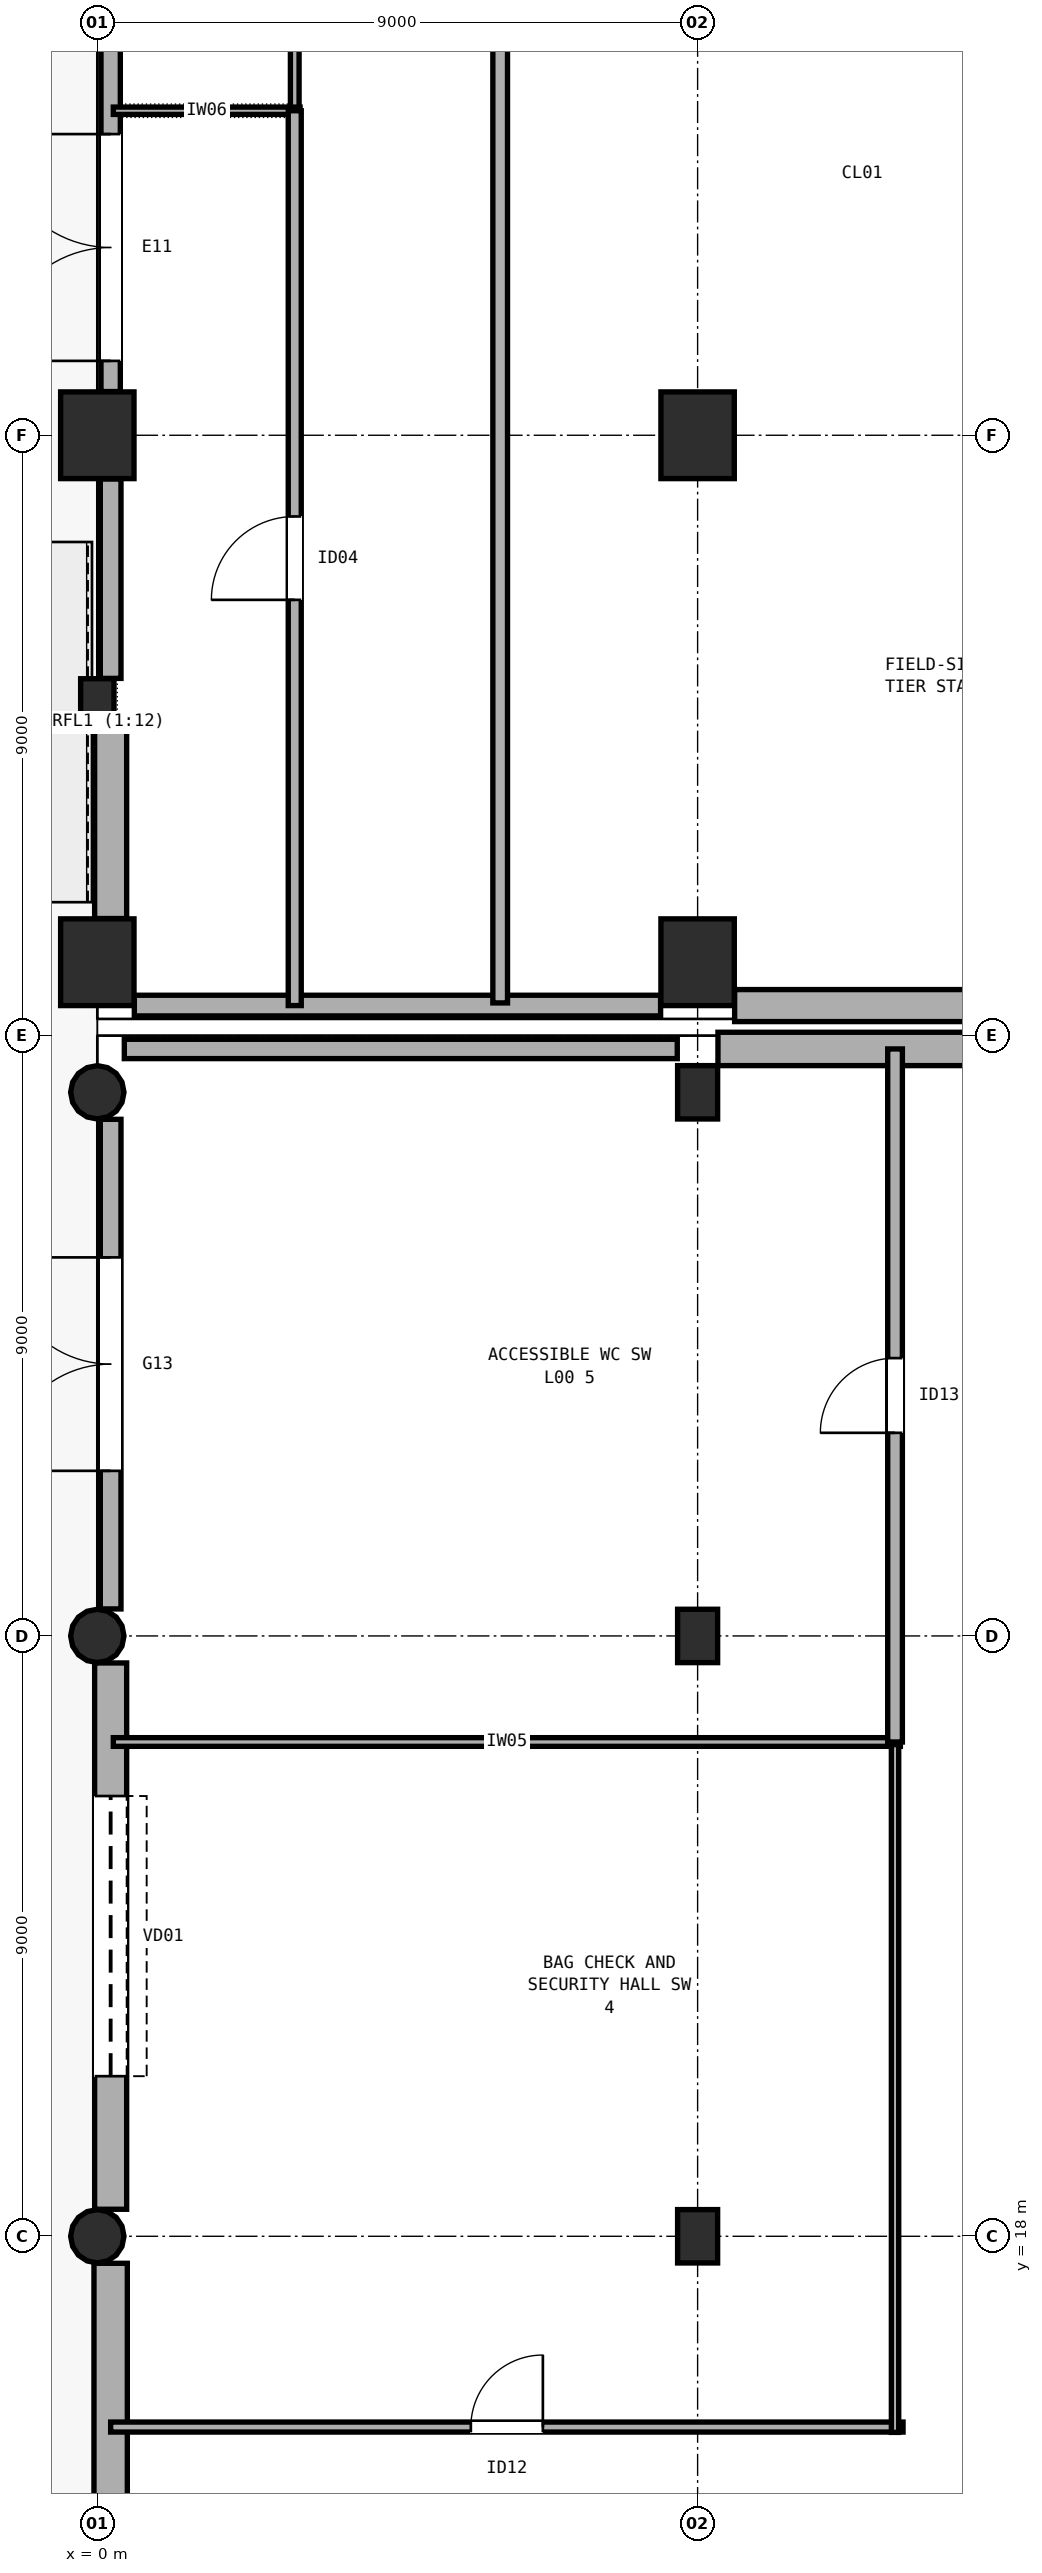
"""IFC4 building model, lengths in metres.
Left out: names, types, materials, properties, quantities, classifications, styles, units other than length and angle.
Written with IfcOpenShell. Run it as: python <this file> out.ifc"""

import sys

from ifc_helpers import new_model, si_unit, direction, frame, frame_2d, origin, origin_2d, place, context, subcontext, project, spatial, rectangle, circle, extrude, element, fill, save


model = new_model("IFC4")
c1 = context("Model", 3, precision=1e-05, world=origin(), true_north=direction((0.0, 1.0)))
c2 = subcontext(c1, "Body", "Model", "MODEL_VIEW")
j1 = project(units=[si_unit("LENGTHUNIT", "METRE"), si_unit("PLANEANGLEUNIT", "RADIAN")], contexts=[c1])
p1 = place(None, origin())
s1 = spatial("IfcSite", under=j1, at=p1, CompositionType="ELEMENT")
p2 = place(p1, origin())
s2 = spatial("IfcBuilding", under=s1, at=p2, CompositionType="ELEMENT")
p3 = place(p2, origin())
s3 = spatial("IfcBuildingStorey", under=s2, at=p3, CompositionType="ELEMENT", Elevation=0.0)
for number, where, z_axis, x_axis in (
    (1, (0.0, 37.1, 0.0), (0.0, 0.0, 1.0), (1.0, 0.0, 0.0)),
    (2, (0.0, 45.0, 0.0), (0.0, 0.0, 1.0), (1.0, 0.0, 0.0)),
    (3, (9.0, 37.1, 0.0), (0.0, 0.0, 1.0), (1.0, 0.0, 0.0)),
    (4, (9.0, 45.0, 0.0), (0.0, 0.0, 1.0), (1.0, 0.0, 0.0)),
):
    element("IfcColumn", number, at=place(p3, frame(where, z_axis=z_axis, x_axis=x_axis)), inside=s3, PredefinedType="COLUMN", context=c2, shape_type="SweptSolid", body=[
        extrude(rectangle(XDim=1.1, YDim=1.3, at=origin_2d()), origin(), (0.0, 0.0, 1.0), 4.8),
    ])
for number, where, z_axis, x_axis in (
    (5, (0.0, 18.0, 0.0), (0.0, 0.0, 1.0), (1.0, 0.0, 0.0)),
    (6, (0.0, 27.0, 0.0), (0.0, 0.0, 1.0), (1.0, 0.0, 0.0)),
    (7, (0.0, 35.15, 0.0), (0.0, 0.0, 1.0), (1.0, 0.0, 0.0)),
):
    element("IfcColumn", number, at=place(p3, frame(where, z_axis=z_axis, x_axis=x_axis)), inside=s3, PredefinedType="COLUMN", context=c2, shape_type="SweptSolid", body=[
        extrude(circle(Radius=0.4, at=origin_2d()), origin(), (0.0, 0.0, 1.0), 4.8),
    ])
for number, where, z_axis, x_axis in (
    (8, (9.0, 18.0, 0.0), (0.0, 0.0, 1.0), (1.0, 0.0, 0.0)),
    (9, (9.0, 27.0, 0.0), (0.0, 0.0, 1.0), (1.0, 0.0, 0.0)),
    (10, (9.0, 35.15, 0.0), (0.0, 0.0, 1.0), (1.0, 0.0, 0.0)),
):
    element("IfcColumn", number, at=place(p3, frame(where, z_axis=z_axis, x_axis=x_axis)), inside=s3, PredefinedType="COLUMN", context=c2, shape_type="SweptSolid", body=[
        extrude(rectangle(XDim=0.6, YDim=0.8, at=origin_2d()), origin(), (0.0, 0.0, 1.0), 4.8),
    ])
p4 = place(p3, frame((0.0, 41.0, 0.0), z_axis=(0.0, 0.0, 1.0), x_axis=(1.0, 0.0, 0.0)))
e11 = element("IfcColumn", 11, at=p4, inside=s3, PredefinedType="PILASTER", context=c2, shape_type="SweptSolid", body=[
    extrude(rectangle(XDim=0.5, YDim=0.7, at=origin_2d()), origin(), (0.0, 0.0, 1.0), 4.8),
])
p5 = place(p3, frame((0.2, 37.755, 0.0), z_axis=(0.0, 0.0, 1.0), x_axis=(0.0, 1.0, 0.0)))
e12 = element("IfcWall", 12, at=p5, inside=s3, PredefinedType="SOLIDWALL", context=c2, shape_type="SweptSolid", body=[
    extrude(rectangle(XDim=2.89, YDim=0.48, at=frame_2d((1.445, 0.0))), origin(), (0.0, 0.0, 1.0), 3.28),
])
p6 = place(p3, frame((0.2, 41.355, 0.0), z_axis=(0.0, 0.0, 1.0), x_axis=(0.0, 1.0, 0.0)))
e13 = element("IfcWall", 13, at=p6, inside=s3, PredefinedType="SOLIDWALL", context=c2, shape_type="SweptSolid", body=[
    extrude(rectangle(XDim=2.99, YDim=0.31, at=frame_2d((1.495, 0.0))), origin(), (0.0, 0.0, 1.0), 3.28),
])
p7 = place(p3, frame((0.2, 45.655, 0.0), z_axis=(0.0, 0.0, 1.0), x_axis=(0.0, 1.0, 0.0)))
e14 = element("IfcWall", 14, at=p7, inside=s3, PredefinedType="SOLIDWALL", context=c2, shape_type="SweptSolid", body=[
    extrude(rectangle(XDim=5.89, YDim=0.29, at=frame_2d((2.945, 0.0))), origin(), (0.0, 0.0, 1.0), 3.58),
])
p8 = place(p7, frame((0.46, 0.0, 0.0)))
e15 = element("IfcOpeningElement", 15, at=p8, cuts=e14, PredefinedType="OPENING", context=c2, shape_type="SweptSolid", body=[
    extrude(rectangle(XDim=3.4, YDim=2.55, at=frame_2d((1.7, 1.275))), frame((0.0, 0.155, 0.0), z_axis=(0.0, -1.0, 0.0), x_axis=(1.0, 0.0, 0.0)), (0.0, 0.0, 1.0), 0.31),
])
p9 = place(p3, frame((17.395, 36.45, 0.0), z_axis=(0.0, 0.0, 1.0), x_axis=(-1.0, 0.0, 0.0)))
e16 = element("IfcWall", 16, at=p9, inside=s3, PredefinedType="SOLIDWALL", context=c2, shape_type="SweptSolid", body=[
    extrude(rectangle(XDim=7.84, YDim=0.48, at=frame_2d((3.92, 0.0))), origin(), (0.0, 0.0, 1.0), 3.28),
])
p10 = place(p3, frame((8.445, 36.45, 0.0), z_axis=(0.0, 0.0, 1.0), x_axis=(-1.0, 0.0, 0.0)))
e17 = element("IfcWall", 17, at=p10, inside=s3, PredefinedType="SOLIDWALL", context=c2, shape_type="SweptSolid", body=[
    extrude(rectangle(XDim=7.89, YDim=0.31, at=frame_2d((3.945, 0.0))), origin(), (0.0, 0.0, 1.0), 3.28),
])
p11 = place(p3, frame((0.2, 9.405, 0.0), z_axis=(0.0, 0.0, 1.0), x_axis=(0.0, 1.0, 0.0)))
e18 = element("IfcWall", 18, at=p11, inside=s3, PredefinedType="SOLIDWALL", context=c2, shape_type="SweptSolid", body=[
    extrude(rectangle(XDim=8.19, YDim=0.5, at=frame_2d((4.095, 0.0))), origin(), (0.0, 0.0, 1.0), 3.58),
])
p12 = place(p3, frame((0.2, 18.405, 0.0), z_axis=(0.0, 0.0, 1.0), x_axis=(0.0, 1.0, 0.0)))
e19 = element("IfcWall", 19, at=p12, inside=s3, PredefinedType="SOLIDWALL", context=c2, shape_type="SweptSolid", body=[
    extrude(rectangle(XDim=8.19, YDim=0.48, at=frame_2d((4.095, 0.0))), origin(), (0.0, 0.0, 1.0), 3.58),
])
p13 = place(p12, frame((1.995, 0.0, 0.0)))
e20 = element("IfcOpeningElement", 20, at=p13, cuts=e19, PredefinedType="OPENING", context=c2, shape_type="SweptSolid", body=[
    extrude(rectangle(XDim=4.2, YDim=3.15, at=frame_2d((2.1, 1.575))), frame((0.0, 0.25, 0.0), z_axis=(0.0, -1.0, 0.0), x_axis=(1.0, 0.0, 0.0)), (0.0, 0.0, 1.0), 0.5),
])
p14 = place(p3, frame((0.2, 27.405, 0.0), z_axis=(0.0, 0.0, 1.0), x_axis=(0.0, 1.0, 0.0)))
e21 = element("IfcWall", 21, at=p14, inside=s3, PredefinedType="SOLIDWALL", context=c2, shape_type="SweptSolid", body=[
    extrude(rectangle(XDim=7.34, YDim=0.31, at=frame_2d((3.67, 0.0))), origin(), (0.0, 0.0, 1.0), 3.28),
])
p15 = place(p14, frame((2.07, 0.0, 0.0)))
e22 = element("IfcOpeningElement", 22, at=p15, cuts=e21, PredefinedType="OPENING", context=c2, shape_type="SweptSolid", body=[
    extrude(rectangle(XDim=3.2, YDim=2.5, at=frame_2d((1.6, 1.25))), frame((0.0, 0.165, 0.0), z_axis=(0.0, -1.0, 0.0), x_axis=(1.0, 0.0, 0.0)), (0.0, 0.0, 1.0), 0.33),
])
p16 = place(p3, frame((0.405, 35.8, 0.0), z_axis=(0.0, 0.0, 1.0), x_axis=(1.0, 0.0, 0.0)))
e23 = element("IfcWall", 23, at=p16, inside=s3, PredefinedType="SOLIDWALL", context=c2, shape_type="SweptSolid", body=[
    extrude(rectangle(XDim=8.29, YDim=0.29, at=frame_2d((4.145, 0.0))), origin(), (0.0, 0.0, 1.0), 3.28),
])
p17 = place(p3, frame((9.305, 35.8, 0.0), z_axis=(0.0, 0.0, 1.0), x_axis=(1.0, 0.0, 0.0)))
e24 = element("IfcWall", 24, at=p17, inside=s3, PredefinedType="SOLIDWALL", context=c2, shape_type="SweptSolid", body=[
    extrude(rectangle(XDim=8.39, YDim=0.5, at=frame_2d((4.195, 0.0))), origin(), (0.0, 0.0, 1.0), 3.28),
])
p18 = place(p3, frame((6.04, 36.49, 0.0), z_axis=(0.0, 0.0, 1.0), x_axis=(0.0, 1.0, 0.0)))
e25 = element("IfcWall", 25, at=p18, inside=s3, PredefinedType="PARTITIONING", context=c2, shape_type="SweptSolid", body=[
    extrude(rectangle(XDim=22.7, YDim=0.22, at=frame_2d((11.35, 0.0))), origin(), (0.0, 0.0, 1.0), 3.28),
])
p19 = place(p3, frame((2.96, 49.865, 0.0), z_axis=(0.0, 0.0, 1.0), x_axis=(0.0, 1.0, 0.0)))
e26 = element("IfcWall", 26, at=p19, inside=s3, PredefinedType="PARTITIONING", context=c2, shape_type="SweptSolid", body=[
    extrude(rectangle(XDim=13.415, YDim=0.13, at=frame_2d((6.708, 0.0))), origin(), (0.0, 0.0, 1.0), 3.28),
])
p20 = place(p19, frame((6.147, 0.0, 0.0)))
e27 = element("IfcOpeningElement", 27, at=p20, cuts=e26, PredefinedType="OPENING", context=c2, shape_type="SweptSolid", body=[
    extrude(rectangle(XDim=1.12, YDim=2.22, at=frame_2d((0.56, 1.11))), frame((0.0, 0.075, 0.0), z_axis=(0.0, -1.0, 0.0), x_axis=(1.0, 0.0, 0.0)), (0.0, 0.0, 1.0), 0.15),
])
p21 = place(p3, frame((3.04, 49.865, 0.0), z_axis=(0.0, 0.0, 1.0), x_axis=(-1.0, 0.0, 0.0)))
e28 = element("IfcWall", 28, at=p21, inside=s3, PredefinedType="PARTITIONING", context=c2, shape_type="SweptSolid", body=[
    extrude(rectangle(XDim=2.8, YDim=0.11, at=frame_2d((1.4, 0.0))), origin(), (0.0, 0.0, 1.0), 3.28),
])
p22 = place(p3, frame((2.96, 36.45, 0.0), z_axis=(0.0, 0.0, 1.0), x_axis=(0.0, 1.0, 0.0)))
e29 = element("IfcWall", 29, at=p22, inside=s3, PredefinedType="PARTITIONING", context=c2, shape_type="SweptSolid", body=[
    extrude(rectangle(XDim=13.415, YDim=0.195, at=frame_2d((6.708, 0.0))), origin(), (0.0, 0.0, 1.0), 3.28),
])
p23 = place(p22, frame((6.083, 0.0, 0.0)))
e30 = element("IfcOpeningElement", 30, at=p23, cuts=e29, PredefinedType="OPENING", context=c2, shape_type="SweptSolid", body=[
    extrude(rectangle(XDim=1.25, YDim=2.15, at=frame_2d((0.625, 1.075))), frame((0.0, 0.107, 0.0), z_axis=(0.0, -1.0, 0.0), x_axis=(1.0, 0.0, 0.0)), (0.0, 0.0, 1.0), 0.215),
])
p24 = place(p3, frame((0.2, 15.14, 0.0), z_axis=(0.0, 0.0, 1.0), x_axis=(1.0, 0.0, 0.0)))
e31 = element("IfcWall", 31, at=p24, inside=s3, PredefinedType="PARTITIONING", context=c2, shape_type="SweptSolid", body=[
    extrude(rectangle(XDim=11.88, YDim=0.15, at=frame_2d((5.94, 0.0))), origin(), (0.0, 0.0, 1.0), 3.28),
])
p25 = place(p24, frame((5.4, 0.0, 0.0)))
e32 = element("IfcOpeningElement", 32, at=p25, cuts=e31, PredefinedType="OPENING", context=c2, shape_type="SweptSolid", body=[
    extrude(rectangle(XDim=1.08, YDim=2.18, at=frame_2d((0.54, 1.09))), frame((0.0, 0.085, 0.0), z_axis=(0.0, -1.0, 0.0), x_axis=(1.0, 0.0, 0.0)), (0.0, 0.0, 1.0), 0.17),
])
p26 = place(p3, frame((0.24, 25.41, 0.0), z_axis=(0.0, 0.0, 1.0), x_axis=(1.0, 0.0, 0.0)))
e33 = element("IfcWall", 33, at=p26, inside=s3, PredefinedType="PARTITIONING", context=c2, shape_type="SweptSolid", body=[
    extrude(rectangle(XDim=11.8, YDim=0.13, at=frame_2d((5.9, 0.0))), origin(), (0.0, 0.0, 1.0), 3.28),
])
p27 = place(p3, frame((11.96, 25.37, 0.0), z_axis=(0.0, 0.0, 1.0), x_axis=(0.0, -1.0, 0.0)))
e34 = element("IfcWall", 34, at=p27, inside=s3, PredefinedType="PARTITIONING", context=c2, shape_type="SweptSolid", body=[
    extrude(rectangle(XDim=10.31, YDim=0.11, at=frame_2d((5.155, 0.0))), origin(), (0.0, 0.0, 1.0), 3.28),
])
p28 = place(p3, frame((11.96, 25.41, 0.0), z_axis=(0.0, 0.0, 1.0), x_axis=(0.0, 1.0, 0.0)))
e35 = element("IfcWall", 35, at=p28, inside=s3, PredefinedType="PARTITIONING", context=c2, shape_type="SweptSolid", body=[
    extrude(rectangle(XDim=10.39, YDim=0.22, at=frame_2d((5.195, 0.0))), origin(), (0.0, 0.0, 1.0), 3.28),
])
p29 = place(p28, frame((4.635, 0.0, 0.0)))
e36 = element("IfcOpeningElement", 36, at=p29, cuts=e35, PredefinedType="OPENING", context=c2, shape_type="SweptSolid", body=[
    extrude(rectangle(XDim=1.12, YDim=2.22, at=frame_2d((0.56, 1.11))), frame((0.0, 0.12, 0.0), z_axis=(0.0, -1.0, 0.0), x_axis=(1.0, 0.0, 0.0)), (0.0, 0.0, 1.0), 0.24),
])
p30 = place(p8, origin())
e37 = element("IfcDoor", 37, at=p30, inside=s3, OperationType="DOUBLE_DOOR_SINGLE_SWING", PredefinedType="DOOR", context=c2, shape_type="SweptSolid", body=[
    extrude(rectangle(XDim=3.4, YDim=2.55, at=frame_2d((1.7, 1.275))), frame((0.0, 0.025, 0.0), z_axis=(0.0, -1.0, 0.0), x_axis=(1.0, 0.0, 0.0)), (0.0, 0.0, 1.0), 0.05),
])
fill(e15, e37)
p31 = place(p15, origin())
e38 = element("IfcDoor", 38, at=p31, inside=s3, OperationType="DOUBLE_DOOR_SINGLE_SWING", PredefinedType="DOOR", context=c2, shape_type="SweptSolid", body=[
    extrude(rectangle(XDim=3.2, YDim=2.5, at=frame_2d((1.6, 1.25))), frame((0.0, 0.025, 0.0), z_axis=(0.0, -1.0, 0.0), x_axis=(1.0, 0.0, 0.0)), (0.0, 0.0, 1.0), 0.05),
])
fill(e22, e38)
p32 = place(p13, origin())
e39 = element("IfcDoor", 39, at=p32, inside=s3, OperationType="ROLLINGUP", PredefinedType="DOOR", context=c2, shape_type="SweptSolid", body=[
    extrude(rectangle(XDim=4.2, YDim=3.15, at=frame_2d((2.1, 1.575))), frame((0.0, 0.025, 0.0), z_axis=(0.0, -1.0, 0.0), x_axis=(1.0, 0.0, 0.0)), (0.0, 0.0, 1.0), 0.05),
])
fill(e20, e39)
p33 = place(p23, origin())
e40 = element("IfcDoor", 40, at=p33, inside=s3, OperationType="SINGLE_SWING_LEFT", PredefinedType="DOOR", context=c2, shape_type="SweptSolid", body=[
    extrude(rectangle(XDim=1.25, YDim=2.15, at=frame_2d((0.625, 1.075))), frame((0.0, 0.025, 0.0), z_axis=(0.0, -1.0, 0.0), x_axis=(1.0, 0.0, 0.0)), (0.0, 0.0, 1.0), 0.05),
])
fill(e30, e40)
p34 = place(p25, origin())
e41 = element("IfcDoor", 41, at=p34, inside=s3, OperationType="SINGLE_SWING_RIGHT", PredefinedType="DOOR", context=c2, shape_type="SweptSolid", body=[
    extrude(rectangle(XDim=1.08, YDim=2.18, at=frame_2d((0.54, 1.09))), frame((0.0, 0.025, 0.0), z_axis=(0.0, -1.0, 0.0), x_axis=(1.0, 0.0, 0.0)), (0.0, 0.0, 1.0), 0.05),
])
fill(e32, e41)
p35 = place(p29, origin())
e42 = element("IfcDoor", 42, at=p35, inside=s3, OperationType="SINGLE_SWING_LEFT", PredefinedType="DOOR", context=c2, shape_type="SweptSolid", body=[
    extrude(rectangle(XDim=1.12, YDim=2.22, at=frame_2d((0.56, 1.11))), frame((0.0, 0.025, 0.0), z_axis=(0.0, -1.0, 0.0), x_axis=(1.0, 0.0, 0.0)), (0.0, 0.0, 1.0), 0.05),
])
fill(e36, e42)
save(model, sys.argv[1])
